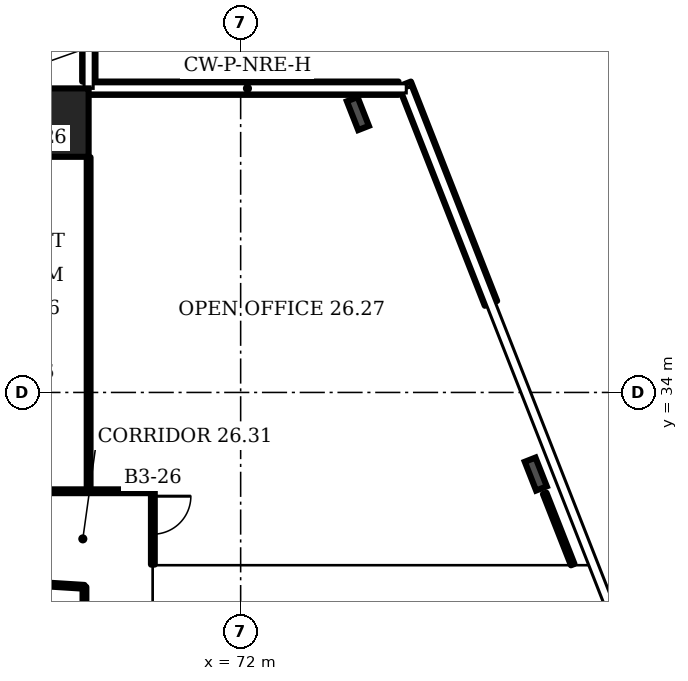
"""IFC4 building model, lengths in metres.
Left out: names, types, materials, properties, quantities, classifications, styles, units other than length and angle.
Written with IfcOpenShell. Run it as: python <this file> out.ifc"""

import sys

from ifc_helpers import new_model, si_unit, direction, frame, frame_2d, origin, origin_2d, place, context, subcontext, project, spatial, rectangle, i_section, extrude, element, fill, save


model = new_model("IFC4")
c1 = context("Model", 3, precision=1e-05, world=origin(), true_north=direction((0.0, 1.0)))
c2 = subcontext(c1, "Body", "Model", "MODEL_VIEW")
j1 = project(units=[si_unit("LENGTHUNIT", "METRE"), si_unit("PLANEANGLEUNIT", "RADIAN")], contexts=[c1])
p1 = place(None, origin())
s1 = spatial("IfcSite", under=j1, at=p1, CompositionType="ELEMENT")
p2 = place(p1, origin())
s2 = spatial("IfcBuilding", under=s1, at=p2, CompositionType="ELEMENT")
p3 = place(p2, frame((0.0, 0.0, 114.7)))
s3 = spatial("IfcBuildingStorey", under=s2, at=p3, CompositionType="ELEMENT", Elevation=114.7)
p4 = place(p3, frame((67.1, 41.1, 0.0), z_axis=(0.0, 0.0, 1.0), x_axis=(1.0, 0.0, 0.0)))
e1 = element("IfcColumn", 1, at=p4, inside=s3, PredefinedType="COLUMN", context=c2, shape_type="SweptSolid", body=[
    extrude(rectangle(XDim=1.8, YDim=1.8, at=origin_2d()), origin(), (0.0, 0.0, 1.0), 3.6),
])
for number, where, z_axis, x_axis in (
    (2, (79.766, 31.853, 0.0), (0.0, 0.0, 1.0), (0.931, 0.366, 0.0)),
    (3, (75.085, 41.338, 0.0), (0.0, 0.0, 1.0), (0.931, 0.366, 0.0)),
):
    element("IfcColumn", number, at=place(p3, frame(where, z_axis=z_axis, x_axis=x_axis)), inside=s3, PredefinedType="COLUMN", context=c2, shape_type="SweptSolid", body=[
        extrude(i_section(OverallWidth=0.303, OverallDepth=0.814, WebThickness=0.021, FlangeThickness=0.04, FilletRadius=0.03, at=origin_2d()), origin(), (0.0, 0.0, 1.0), 3.6),
    ])
p5 = place(p3, frame((78.586, 36.344, 0.0), z_axis=(0.0, 0.0, 1.0), x_axis=(-0.365792, 0.930699, 0.0)))
e4 = element("IfcWall", 4, at=p5, inside=s3, PredefinedType="SOLIDWALL", context=c2, shape_type="SweptSolid", body=[
    extrude(rectangle(XDim=6.202, YDim=0.35, at=frame_2d((3.101, 0.0))), origin(), (0.0, 0.0, 1.0), 1.0),
])
p6 = place(p3, frame((76.155, 42.005, 0.0), z_axis=(0.0, 0.0, 1.0), x_axis=(-1.0, 0.0, 0.0)))
e5 = element("IfcWall", 5, at=p6, inside=s3, PredefinedType="SOLIDWALL", context=c2, shape_type="SweptSolid", body=[
    extrude(rectangle(XDim=8.155, YDim=0.35, at=frame_2d((4.078, 0.0))), origin(), (0.0, 0.0, 1.0), 1.0),
])
p7 = place(p3, frame((68.005, 42.18, 0.0), z_axis=(0.0, 0.0, 1.0), x_axis=(0.0, 1.0, 0.0)))
e6 = element("IfcWall", 6, at=p7, inside=s3, PredefinedType="SOLIDWALL", context=c2, shape_type="SweptSolid", body=[
    extrude(rectangle(XDim=5.947, YDim=0.35, at=frame_2d((2.973, 0.0))), origin(), (0.0, 0.0, 1.0), 1.0),
])
p8 = place(p3, frame((65.0, 31.4, 0.0), z_axis=(0.0, 0.0, 1.0), x_axis=(1.0, 0.0, 0.0)))
e7 = element("IfcWall", 7, at=p8, inside=s3, PredefinedType="PARTITIONING", context=c2, shape_type="SweptSolid", body=[
    extrude(rectangle(XDim=4.69, YDim=0.1, at=frame_2d((2.345, 0.0))), origin(), (0.0, 0.0, 1.0), 3.2),
])
p9 = place(p3, frame((67.89, 24.4, 0.0), z_axis=(0.0, 0.0, 1.0), x_axis=(0.0, 1.0, 0.0)))
e8 = element("IfcWall", 8, at=p9, inside=s3, PredefinedType="PARTITIONING", context=c2, shape_type="SweptSolid", body=[
    extrude(rectangle(XDim=4.485, YDim=0.1, at=frame_2d((2.243, 0.0))), origin(), (0.0, 0.0, 1.0), 3.2),
])
p10 = place(p3, frame((67.89, 28.885, 0.0), z_axis=(0.0, 0.0, 1.0), x_axis=(-0.998031, 0.062786, 0.0)))
e9 = element("IfcWall", 9, at=p10, inside=s3, PredefinedType="PARTITIONING", context=c2, shape_type="SweptSolid", body=[
    extrude(rectangle(XDim=3.021, YDim=0.1, at=frame_2d((1.511, 0.0))), origin(), (0.0, 0.0, 1.0), 3.2),
])
p11 = place(p3, frame((68.0, 31.4, 0.0), z_axis=(0.0, 0.0, 1.0), x_axis=(0.0, 1.0, 0.0)))
e10 = element("IfcWall", 10, at=p11, inside=s3, PredefinedType="PARTITIONING", context=c2, shape_type="SweptSolid", body=[
    extrude(rectangle(XDim=8.79, YDim=0.1, at=frame_2d((4.395, 0.0))), origin(), (0.0, 0.0, 1.0), 3.2),
])
p12 = place(p3, frame((69.69, 29.47, 0.0), z_axis=(0.0, 0.0, 1.0), x_axis=(0.0, 1.0, 0.0)))
e11 = element("IfcWall", 11, at=p12, inside=s3, PredefinedType="PARTITIONING", context=c2, shape_type="SweptSolid", body=[
    extrude(rectangle(XDim=1.93, YDim=0.1, at=frame_2d((0.965, 0.0))), origin(), (0.0, 0.0, 1.0), 3.2),
])
p13 = place(p12, frame((0.8, 0.0, 0.0)))
e12 = element("IfcOpeningElement", 12, at=p13, cuts=e11, PredefinedType="OPENING", context=c2, shape_type="SweptSolid", body=[
    extrude(rectangle(XDim=1.0, YDim=2.1, at=frame_2d((0.5, 1.05))), frame((0.0, 0.06, 0.0), z_axis=(0.0, -1.0, 0.0), x_axis=(1.0, 0.0, 0.0)), (0.0, 0.0, 1.0), 0.12),
])
p14 = place(p3, frame((80.737, 29.47, 0.0), z_axis=(0.0, 0.0, 1.0), x_axis=(-0.365847, 0.930674, 0.0)))
e13 = element("IfcWall", 13, at=p14, inside=s3, PredefinedType="PARTITIONING", context=c2, shape_type="SweptSolid", body=[
    extrude(rectangle(XDim=2.015, YDim=0.1, at=frame_2d((1.007, 0.0))), origin(), (0.0, 0.0, 1.0), 2.58),
])
p15 = place(p13, origin())
e14 = element("IfcDoor", 14, at=p15, inside=s3, OperationType="SINGLE_SWING_RIGHT", PredefinedType="DOOR", context=c2, shape_type="SweptSolid", body=[
    extrude(rectangle(XDim=1.0, YDim=2.1, at=frame_2d((0.5, 1.05))), frame((0.0, 0.025, 0.0), z_axis=(0.0, -1.0, 0.0), x_axis=(1.0, 0.0, 0.0)), (0.0, 0.0, 1.0), 0.05),
])
fill(e12, e14)
save(model, sys.argv[1])
